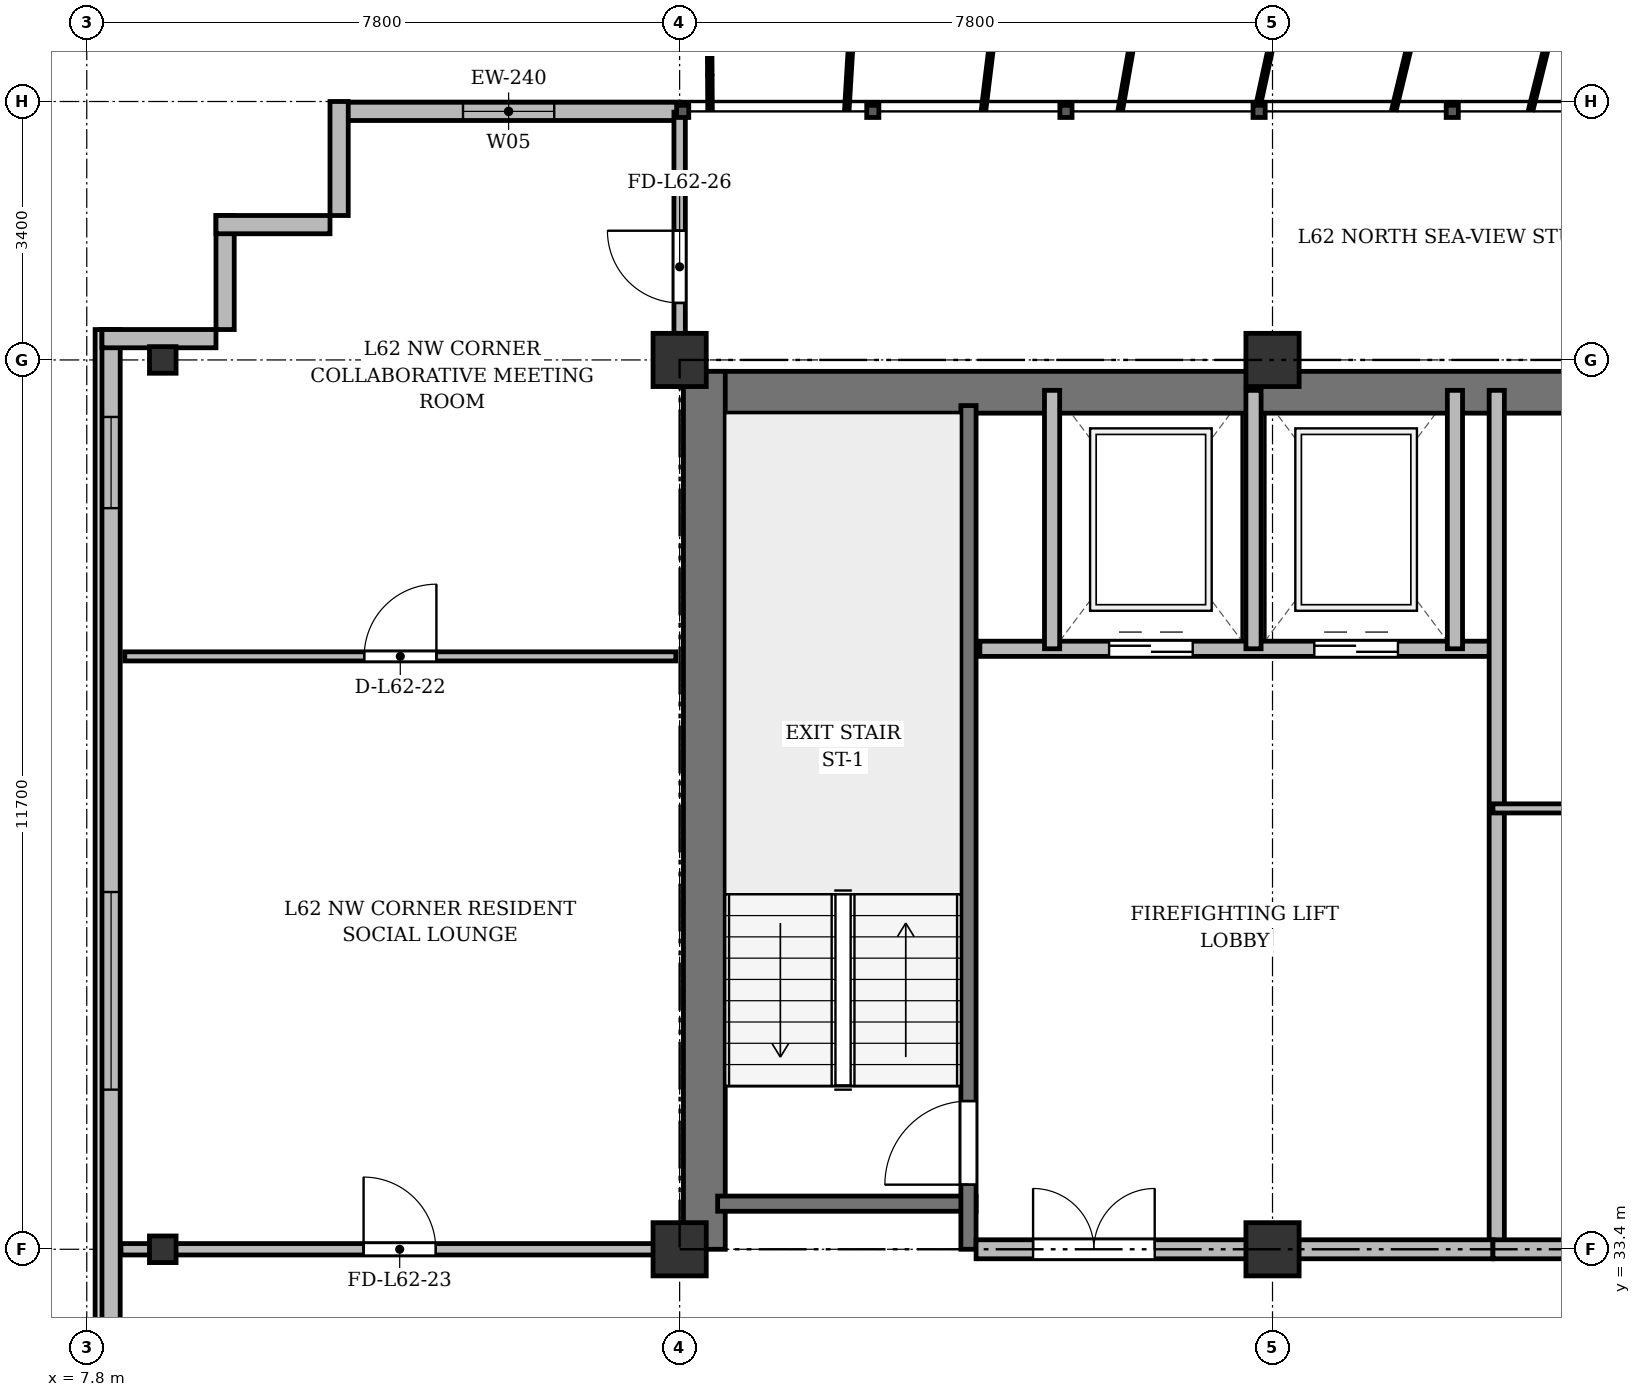
"""IFC4 building model, lengths in metres.
Left out: names, types, materials, properties, quantities, classifications, styles, units other than length and angle.
Written with IfcOpenShell. Run it as: python <this file> out.ifc"""

import sys

from ifc_helpers import new_model, si_unit, direction, frame, frame_2d, origin, origin_2d, place, context, subcontext, project, spatial, rectangle, i_section, extrude, source, transform, mapped, element, fill, save


model = new_model("IFC4")
c1 = context("Model", 3, precision=1e-05, world=origin(), true_north=direction((0.0, 1.0)))
c2 = subcontext(c1, "Body", "Model", "MODEL_VIEW")
j1 = project(units=[si_unit("LENGTHUNIT", "METRE"), si_unit("PLANEANGLEUNIT", "RADIAN")], contexts=[c1])
p1 = place(None, origin())
s1 = spatial("IfcSite", under=j1, at=p1, CompositionType="ELEMENT")
p2 = place(p1, origin())
s2 = spatial("IfcBuilding", under=s1, at=p2, CompositionType="ELEMENT")
p3 = place(p2, frame((0.0, 0.0, 237.3)))
s3 = spatial("IfcBuildingStorey", under=s2, at=p3, CompositionType="ELEMENT", Elevation=237.3)
m1 = source(origin(), c2, "Body", "SweptSolid", [
    extrude(i_section(OverallWidth=0.35, OverallDepth=0.35, WebThickness=0.018, FlangeThickness=0.028, at=origin_2d()), origin(), (0.0, 0.0, 1.0), 3.6),
])
for number, where, z_axis, x_axis in (
    (1, (8.8, 33.4, 0.0), (0.0, 0.0, 1.0), (1.0, 0.0, 0.0)),
    (2, (8.8, 45.1, 0.0), (0.0, 0.0, 1.0), (1.0, 0.0, 0.0)),
):
    element("IfcColumn", number, at=place(p3, frame(where, z_axis=z_axis, x_axis=x_axis)), inside=s3, PredefinedType="COLUMN", context=c2, shape_type="MappedRepresentation", body=[
        mapped(m1, transform((0.0, 0.0, 0.0), x_axis=(1.0, 0.0, 0.0), y_axis=(0.0, 1.0, 0.0), z_axis=(0.0, 0.0, 1.0), scale=1.0)),
    ])
m2 = source(origin(), c2, "Body", "SweptSolid", [
    extrude(rectangle(XDim=0.7, YDim=0.7, at=origin_2d()), origin(), (0.0, 0.0, 1.0), 3.6),
])
for number, where, z_axis, x_axis in (
    (3, (15.6, 33.4, 0.0), (0.0, 0.0, 1.0), (1.0, 0.0, 0.0)),
    (4, (15.6, 45.1, 0.0), (0.0, 0.0, 1.0), (1.0, 0.0, 0.0)),
    (5, (23.4, 33.4, 0.0), (0.0, 0.0, 1.0), (1.0, 0.0, 0.0)),
    (6, (23.4, 45.1, 0.0), (0.0, 0.0, 1.0), (1.0, 0.0, 0.0)),
):
    element("IfcColumn", number, at=place(p3, frame(where, z_axis=z_axis, x_axis=x_axis)), inside=s3, PredefinedType="COLUMN", context=c2, shape_type="MappedRepresentation", body=[
        mapped(m2, transform((0.0, 0.0, 0.0), x_axis=(1.0, 0.0, 0.0), y_axis=(0.0, 1.0, 0.0), z_axis=(0.0, 0.0, 1.0), scale=1.0)),
    ])
p4 = place(p3, frame((11.1, 48.37, 0.0), z_axis=(0.0, 0.0, 1.0), x_axis=(1.0, 0.0, 0.0)))
e7 = element("IfcWall", 7, at=p4, inside=s3, PredefinedType="SOLIDWALL", context=c2, shape_type="SweptSolid", body=[
    extrude(rectangle(XDim=4.5, YDim=0.24, at=frame_2d((2.25, 0.0))), origin(), (0.0, 0.0, 1.0), 3.22),
])
p5 = place(p4, frame((1.65, 0.0, 0.9)))
e8 = element("IfcOpeningElement", 8, at=p5, cuts=e7, PredefinedType="OPENING", context=c2, shape_type="SweptSolid", body=[
    extrude(rectangle(XDim=1.2, YDim=1.65, at=frame_2d((0.6, 0.825))), frame((0.0, 0.13, 0.0), z_axis=(0.0, -1.0, 0.0), x_axis=(1.0, 0.0, 0.0)), (0.0, 0.0, 1.0), 0.26),
])
p6 = place(p3, frame((8.12, 6.4, 0.0), z_axis=(0.0, 0.0, 1.0), x_axis=(0.0, 1.0, 0.0)))
e9 = element("IfcWall", 9, at=p6, inside=s3, PredefinedType="SOLIDWALL", context=c2, shape_type="SweptSolid", body=[
    extrude(rectangle(XDim=39.1, YDim=0.24, at=frame_2d((19.55, 0.0))), origin(), (0.0, 0.0, 1.0), 3.22),
])
p7 = place(p6, frame((1.45, 0.0, 0.92)))
e10 = element("IfcOpeningElement", 10, at=p7, cuts=e9, PredefinedType="OPENING", context=c2, shape_type="SweptSolid", body=[
    extrude(rectangle(XDim=1.2, YDim=1.65, at=frame_2d((0.6, 0.825))), frame((0.0, 0.13, 0.0), z_axis=(0.0, -1.0, 0.0), x_axis=(1.0, 0.0, 0.0)), (0.0, 0.0, 1.0), 0.26),
])
p8 = place(p6, frame((3.7, 0.0, 0.92)))
e11 = element("IfcOpeningElement", 11, at=p8, cuts=e9, PredefinedType="OPENING", context=c2, shape_type="SweptSolid", body=[
    extrude(rectangle(XDim=2.6, YDim=1.9, at=frame_2d((1.3, 0.95))), frame((0.0, 0.13, 0.0), z_axis=(0.0, -1.0, 0.0), x_axis=(1.0, 0.0, 0.0)), (0.0, 0.0, 1.0), 0.26),
])
p9 = place(p6, frame((7.9, 0.0, 0.92)))
e12 = element("IfcOpeningElement", 12, at=p9, cuts=e9, PredefinedType="OPENING", context=c2, shape_type="SweptSolid", body=[
    extrude(rectangle(XDim=2.6, YDim=1.9, at=frame_2d((1.3, 0.95))), frame((0.0, 0.13, 0.0), z_axis=(0.0, -1.0, 0.0), x_axis=(1.0, 0.0, 0.0)), (0.0, 0.0, 1.0), 0.26),
])
p10 = place(p6, frame((15.1, 0.0, 0.92)))
e13 = element("IfcOpeningElement", 13, at=p10, cuts=e9, PredefinedType="OPENING", context=c2, shape_type="SweptSolid", body=[
    extrude(rectangle(XDim=2.6, YDim=1.9, at=frame_2d((1.3, 0.95))), frame((0.0, 0.13, 0.0), z_axis=(0.0, -1.0, 0.0), x_axis=(1.0, 0.0, 0.0)), (0.0, 0.0, 1.0), 0.26),
])
p11 = place(p6, frame((29.1, 0.0, 0.92)))
e14 = element("IfcOpeningElement", 14, at=p11, cuts=e9, PredefinedType="OPENING", context=c2, shape_type="SweptSolid", body=[
    extrude(rectangle(XDim=2.6, YDim=1.9, at=frame_2d((1.3, 0.95))), frame((0.0, 0.13, 0.0), z_axis=(0.0, -1.0, 0.0), x_axis=(1.0, 0.0, 0.0)), (0.0, 0.0, 1.0), 0.26),
])
p12 = place(p6, frame((36.75, 0.0, 0.92)))
e15 = element("IfcOpeningElement", 15, at=p12, cuts=e9, PredefinedType="OPENING", context=c2, shape_type="SweptSolid", body=[
    extrude(rectangle(XDim=1.2, YDim=1.65, at=frame_2d((0.6, 0.825))), frame((0.0, 0.13, 0.0), z_axis=(0.0, -1.0, 0.0), x_axis=(1.0, 0.0, 0.0)), (0.0, 0.0, 1.0), 0.26),
])
for number, where, z_axis, x_axis in (
    (16, (8.0, 45.38, 0.0), (0.0, 0.0, 1.0), (1.0, 0.0, 0.0)),
    (17, (9.62, 45.5, 0.0), (0.0, 0.0, 1.0), (0.0, 1.0, 0.0)),
    (18, (9.5, 46.88, 0.0), (0.0, 0.0, 1.0), (1.0, 0.0, 0.0)),
    (19, (11.12, 47.0, 0.0), (0.0, 0.0, 1.0), (0.0, 1.0, 0.0)),
):
    element("IfcWall", number, at=place(p3, frame(where, z_axis=z_axis, x_axis=x_axis)), inside=s3, PredefinedType="SOLIDWALL", context=c2, shape_type="SweptSolid", body=[
        extrude(rectangle(XDim=1.5, YDim=0.24, at=frame_2d((0.75, 0.0))), origin(), (0.0, 0.0, 1.0), 3.22),
    ])
p13 = place(p3, frame((15.65, 44.675, 0.0), z_axis=(0.0, 0.0, 1.0), x_axis=(1.0, 0.0, 0.0)))
e20 = element("IfcWall", 20, at=p13, inside=s3, PredefinedType="SHEAR", context=c2, shape_type="SweptSolid", body=[
    extrude(rectangle(XDim=43.1, YDim=0.55, at=frame_2d((21.55, 0.0))), origin(), (0.0, 0.0, 1.0), 3.22),
])
p14 = place(p3, frame((15.925, 33.4, 0.0), z_axis=(0.0, 0.0, 1.0), x_axis=(0.0, 1.0, 0.0)))
e21 = element("IfcWall", 21, at=p14, inside=s3, PredefinedType="SHEAR", context=c2, shape_type="SweptSolid", body=[
    extrude(rectangle(XDim=11.55, YDim=0.55, at=frame_2d((5.775, 0.0))), origin(), (0.0, 0.0, 1.0), 3.22),
])
p15 = place(p3, frame((16.1, 34.0, 0.0), z_axis=(0.0, 0.0, 1.0), x_axis=(1.0, 0.0, 0.0)))
e22 = element("IfcWall", 22, at=p15, inside=s3, PredefinedType="SHEAR", context=c2, shape_type="SweptSolid", body=[
    extrude(rectangle(XDim=3.4, YDim=0.2, at=frame_2d((1.7, 0.0))), origin(), (0.0, 0.0, 1.0), 3.22),
])
p16 = place(p3, frame((19.4, 33.4, 0.0), z_axis=(0.0, 0.0, 1.0), x_axis=(0.0, 1.0, 0.0)))
e23 = element("IfcWall", 23, at=p16, inside=s3, PredefinedType="SHEAR", context=c2, shape_type="SweptSolid", body=[
    extrude(rectangle(XDim=11.1, YDim=0.2, at=frame_2d((5.55, 0.0))), origin(), (0.0, 0.0, 1.0), 3.22),
])
p17 = place(p16, frame((0.85, 0.0, 0.0)))
e24 = element("IfcOpeningElement", 24, at=p17, cuts=e23, PredefinedType="OPENING", context=c2, shape_type="SweptSolid", body=[
    extrude(rectangle(XDim=1.1, YDim=2.15, at=frame_2d((0.55, 1.075))), frame((0.0, 0.11, 0.0), z_axis=(0.0, -1.0, 0.0), x_axis=(1.0, 0.0, 0.0)), (0.0, 0.0, 1.0), 0.22),
])
p18 = place(p3, frame((19.55, 41.3, 0.0), z_axis=(0.0, 0.0, 1.0), x_axis=(1.0, 0.0, 0.0)))
e25 = element("IfcWall", 25, at=p18, inside=s3, PredefinedType="SOLIDWALL", context=c2, shape_type="SweptSolid", body=[
    extrude(rectangle(XDim=6.75, YDim=0.2, at=frame_2d((3.375, 0.0))), origin(), (0.0, 0.0, 1.0), 3.22),
])
p19 = place(p18, frame((1.7, 0.0, 0.0)))
e26 = element("IfcOpeningElement", 26, at=p19, cuts=e25, PredefinedType="OPENING", context=c2, shape_type="SweptSolid", body=[
    extrude(rectangle(XDim=1.1, YDim=2.15, at=frame_2d((0.55, 1.075))), frame((0.0, 0.11, 0.0), z_axis=(0.0, -1.0, 0.0), x_axis=(1.0, 0.0, 0.0)), (0.0, 0.0, 1.0), 0.22),
])
p20 = place(p18, frame((4.4, 0.0, 0.0)))
e27 = element("IfcOpeningElement", 27, at=p20, cuts=e25, PredefinedType="OPENING", context=c2, shape_type="SweptSolid", body=[
    extrude(rectangle(XDim=1.1, YDim=2.15, at=frame_2d((0.55, 1.075))), frame((0.0, 0.11, 0.0), z_axis=(0.0, -1.0, 0.0), x_axis=(1.0, 0.0, 0.0)), (0.0, 0.0, 1.0), 0.22),
])
for number, where, z_axis, x_axis in (
    (28, (20.5, 41.3, 0.0), (0.0, 0.0, 1.0), (0.0, 1.0, 0.0)),
    (29, (23.15, 41.3, 0.0), (0.0, 0.0, 1.0), (0.0, 1.0, 0.0)),
    (30, (25.8, 41.3, 0.0), (0.0, 0.0, 1.0), (0.0, 1.0, 0.0)),
):
    element("IfcWall", number, at=place(p3, frame(where, z_axis=z_axis, x_axis=x_axis)), inside=s3, PredefinedType="SOLIDWALL", context=c2, shape_type="SweptSolid", body=[
        extrude(rectangle(XDim=3.4, YDim=0.2, at=frame_2d((1.7, 0.0))), origin(), (0.0, 0.0, 1.0), 3.22),
    ])
p21 = place(p3, frame((26.35, 33.4, 0.0), z_axis=(0.0, 0.0, 1.0), x_axis=(0.0, 1.0, 0.0)))
e31 = element("IfcWall", 31, at=p21, inside=s3, PredefinedType="SOLIDWALL", context=c2, shape_type="SweptSolid", body=[
    extrude(rectangle(XDim=11.3, YDim=0.2, at=frame_2d((5.65, 0.0))), origin(), (0.0, 0.0, 1.0), 2.77),
])
p22 = place(p3, frame((19.5, 33.4, 0.0), z_axis=(0.0, 0.0, 1.0), x_axis=(1.0, 0.0, 0.0)))
e32 = element("IfcWall", 32, at=p22, inside=s3, PredefinedType="PARTITIONING", context=c2, shape_type="SweptSolid", body=[
    extrude(rectangle(XDim=6.8, YDim=0.25, at=frame_2d((3.4, 0.0))), origin(), (0.0, 0.0, 1.0), 2.77),
])
p23 = place(p22, frame((0.75, 0.0, 0.0)))
e33 = element("IfcOpeningElement", 33, at=p23, cuts=e32, PredefinedType="OPENING", context=c2, shape_type="SweptSolid", body=[
    extrude(rectangle(XDim=1.6, YDim=2.2, at=frame_2d((0.8, 1.1))), frame((0.0, 0.135, 0.0), z_axis=(0.0, -1.0, 0.0), x_axis=(1.0, 0.0, 0.0)), (0.0, 0.0, 1.0), 0.27),
])
p24 = place(p3, frame((26.3, 39.2, 0.0), z_axis=(0.0, 0.0, 1.0), x_axis=(1.0, 0.0, 0.0)))
e34 = element("IfcWall", 34, at=p24, inside=s3, PredefinedType="PARTITIONING", context=c2, shape_type="SweptSolid", body=[
    extrude(rectangle(XDim=7.0, YDim=0.12, at=frame_2d((3.5, 0.0))), origin(), (0.0, 0.0, 1.0), 2.72),
])
p25 = place(p24, frame((2.6, 0.0, 0.0)))
e35 = element("IfcOpeningElement", 35, at=p25, cuts=e34, PredefinedType="OPENING", context=c2, shape_type="SweptSolid", body=[
    extrude(rectangle(XDim=0.95, YDim=2.15, at=frame_2d((0.475, 1.075))), frame((0.0, 0.07, 0.0), z_axis=(0.0, -1.0, 0.0), x_axis=(1.0, 0.0, 0.0)), (0.0, 0.0, 1.0), 0.14),
])
p26 = place(p3, frame((26.3, 33.4, 0.0), z_axis=(0.0, 0.0, 1.0), x_axis=(1.0, 0.0, 0.0)))
e36 = element("IfcWall", 36, at=p26, inside=s3, PredefinedType="PARTITIONING", context=c2, shape_type="SweptSolid", body=[
    extrude(rectangle(XDim=7.0, YDim=0.25, at=frame_2d((3.5, 0.0))), origin(), (0.0, 0.0, 1.0), 2.77),
])
p27 = place(p26, frame((1.35, 0.0, 0.0)))
e37 = element("IfcOpeningElement", 37, at=p27, cuts=e36, PredefinedType="OPENING", context=c2, shape_type="SweptSolid", body=[
    extrude(rectangle(XDim=0.95, YDim=2.15, at=frame_2d((0.475, 1.075))), frame((0.0, 0.135, 0.0), z_axis=(0.0, -1.0, 0.0), x_axis=(1.0, 0.0, 0.0)), (0.0, 0.0, 1.0), 0.27),
])
p28 = place(p3, frame((8.3, 41.2, 0.0), z_axis=(0.0, 0.0, 1.0), x_axis=(1.0, 0.0, 0.0)))
e38 = element("IfcWall", 38, at=p28, inside=s3, PredefinedType="PARTITIONING", context=c2, shape_type="SweptSolid", body=[
    extrude(rectangle(XDim=7.25, YDim=0.12, at=frame_2d((3.625, 0.0))), origin(), (0.0, 0.0, 1.0), 2.72),
])
p29 = place(p28, frame((3.15, 0.0, 0.0)))
e39 = element("IfcOpeningElement", 39, at=p29, cuts=e38, PredefinedType="OPENING", context=c2, shape_type="SweptSolid", body=[
    extrude(rectangle(XDim=0.95, YDim=2.15, at=frame_2d((0.475, 1.075))), frame((0.0, 0.07, 0.0), z_axis=(0.0, -1.0, 0.0), x_axis=(1.0, 0.0, 0.0)), (0.0, 0.0, 1.0), 0.14),
])
p30 = place(p3, frame((8.25, 33.4, 0.0), z_axis=(0.0, 0.0, 1.0), x_axis=(1.0, 0.0, 0.0)))
e40 = element("IfcWall", 40, at=p30, inside=s3, PredefinedType="PARTITIONING", context=c2, shape_type="SweptSolid", body=[
    extrude(rectangle(XDim=7.35, YDim=0.15, at=frame_2d((3.675, 0.0))), origin(), (0.0, 0.0, 1.0), 2.77),
])
p31 = place(p30, frame((3.192, 0.0, 0.0)))
e41 = element("IfcOpeningElement", 41, at=p31, cuts=e40, PredefinedType="OPENING", context=c2, shape_type="SweptSolid", body=[
    extrude(rectangle(XDim=0.95, YDim=2.15, at=frame_2d((0.475, 1.075))), frame((0.0, 0.085, 0.0), z_axis=(0.0, -1.0, 0.0), x_axis=(1.0, 0.0, 0.0)), (0.0, 0.0, 1.0), 0.17),
])
p32 = place(p3, frame((15.6, 44.75, 0.0), z_axis=(0.0, 0.0, 1.0), x_axis=(0.0, 1.0, 0.0)))
e42 = element("IfcWall", 42, at=p32, inside=s3, PredefinedType="PARTITIONING", context=c2, shape_type="SweptSolid", body=[
    extrude(rectangle(XDim=3.61, YDim=0.15, at=frame_2d((1.805, 0.0))), origin(), (0.0, 0.0, 1.0), 2.72),
])
p33 = place(p32, frame((1.1, 0.0, 0.0)))
e43 = element("IfcOpeningElement", 43, at=p33, cuts=e42, PredefinedType="OPENING", context=c2, shape_type="SweptSolid", body=[
    extrude(rectangle(XDim=0.95, YDim=2.15, at=frame_2d((0.475, 1.075))), frame((0.0, 0.085, 0.0), z_axis=(0.0, -1.0, 0.0), x_axis=(1.0, 0.0, 0.0)), (0.0, 0.0, 1.0), 0.17),
])
m3 = source(origin(), c2, "Body", "SweptSolid", [
    extrude(rectangle(XDim=1.2, YDim=1.65, at=frame_2d((0.6, 0.825))), frame((0.0, 0.03, 0.0), z_axis=(0.0, -1.0, 0.0), x_axis=(1.0, 0.0, 0.0)), (0.0, 0.0, 1.0), 0.06),
])
p34 = place(p5, origin())
e44 = element("IfcWindow", 44, at=p34, inside=s3, PartitioningType="SINGLE_PANEL", PredefinedType="WINDOW", context=c2, shape_type="MappedRepresentation", body=[
    mapped(m3, transform((0.0, 0.0, 0.0), x_axis=(1.0, 0.0, 0.0), y_axis=(0.0, 1.0, 0.0), z_axis=(0.0, 0.0, 1.0), scale=1.0)),
])
fill(e8, e44)
m4 = source(origin(), c2, "Body", "SweptSolid", [
    extrude(rectangle(XDim=2.6, YDim=1.9, at=frame_2d((1.3, 0.95))), frame((0.0, 0.03, 0.0), z_axis=(0.0, -1.0, 0.0), x_axis=(1.0, 0.0, 0.0)), (0.0, 0.0, 1.0), 0.06),
])
p35 = place(p11, origin())
e45 = element("IfcWindow", 45, at=p35, inside=s3, PartitioningType="SINGLE_PANEL", PredefinedType="WINDOW", context=c2, shape_type="MappedRepresentation", body=[
    mapped(m4, transform((0.0, 0.0, 0.0), x_axis=(1.0, 0.0, 0.0), y_axis=(0.0, 1.0, 0.0), z_axis=(0.0, 0.0, 1.0), scale=1.0)),
])
fill(e14, e45)
p36 = place(p12, origin())
e46 = element("IfcWindow", 46, at=p36, inside=s3, PartitioningType="SINGLE_PANEL", PredefinedType="WINDOW", context=c2, shape_type="MappedRepresentation", body=[
    mapped(m3, transform((0.0, 0.0, 0.0), x_axis=(1.0, 0.0, 0.0), y_axis=(0.0, 1.0, 0.0), z_axis=(0.0, 0.0, 1.0), scale=1.0)),
])
fill(e15, e46)
m5 = source(origin(), c2, "Body", "SweptSolid", [
    extrude(rectangle(XDim=1.1, YDim=2.15, at=frame_2d((0.55, 1.075))), frame((0.0, 0.025, 0.0), z_axis=(0.0, -1.0, 0.0), x_axis=(1.0, 0.0, 0.0)), (0.0, 0.0, 1.0), 0.05),
])
p37 = place(p17, origin())
e47 = element("IfcDoor", 47, at=p37, inside=s3, OperationType="SINGLE_SWING_LEFT", PredefinedType="DOOR", context=c2, shape_type="MappedRepresentation", body=[
    mapped(m5, transform((0.0, 0.0, 0.0), x_axis=(1.0, 0.0, 0.0), y_axis=(0.0, 1.0, 0.0), z_axis=(0.0, 0.0, 1.0), scale=1.0)),
])
fill(e24, e47)
p38 = place(p19, origin())
e48 = element("IfcDoor", 48, at=p38, inside=s3, OperationType="DOUBLE_DOOR_SLIDING", PredefinedType="DOOR", context=c2, shape_type="MappedRepresentation", body=[
    mapped(m5, transform((0.0, 0.0, 0.0), x_axis=(1.0, 0.0, 0.0), y_axis=(0.0, 1.0, 0.0), z_axis=(0.0, 0.0, 1.0), scale=1.0)),
])
fill(e26, e48)
p39 = place(p20, origin())
e49 = element("IfcDoor", 49, at=p39, inside=s3, OperationType="DOUBLE_DOOR_SLIDING", PredefinedType="DOOR", context=c2, shape_type="MappedRepresentation", body=[
    mapped(m5, transform((0.0, 0.0, 0.0), x_axis=(1.0, 0.0, 0.0), y_axis=(0.0, 1.0, 0.0), z_axis=(0.0, 0.0, 1.0), scale=1.0)),
])
fill(e27, e49)
m6 = source(origin(), c2, "Body", "SweptSolid", [
    extrude(rectangle(XDim=1.6, YDim=2.2, at=frame_2d((0.8, 1.1))), frame((0.0, 0.025, 0.0), z_axis=(0.0, -1.0, 0.0), x_axis=(1.0, 0.0, 0.0)), (0.0, 0.0, 1.0), 0.05),
])
p40 = place(p23, origin())
e50 = element("IfcDoor", 50, at=p40, inside=s3, OperationType="DOUBLE_DOOR_SINGLE_SWING", PredefinedType="DOOR", context=c2, shape_type="MappedRepresentation", body=[
    mapped(m6, transform((0.0, 0.0, 0.0), x_axis=(1.0, 0.0, 0.0), y_axis=(0.0, 1.0, 0.0), z_axis=(0.0, 0.0, 1.0), scale=1.0)),
])
fill(e33, e50)
m7 = source(origin(), c2, "Body", "SweptSolid", [
    extrude(rectangle(XDim=0.95, YDim=2.15, at=frame_2d((0.475, 1.075))), frame((0.0, 0.025, 0.0), z_axis=(0.0, -1.0, 0.0), x_axis=(1.0, 0.0, 0.0)), (0.0, 0.0, 1.0), 0.05),
])
p41 = place(p29, origin())
e51 = element("IfcDoor", 51, at=p41, inside=s3, OperationType="SINGLE_SWING_RIGHT", PredefinedType="DOOR", context=c2, shape_type="MappedRepresentation", body=[
    mapped(m7, transform((0.0, 0.0, 0.0), x_axis=(1.0, 0.0, 0.0), y_axis=(0.0, 1.0, 0.0), z_axis=(0.0, 0.0, 1.0), scale=1.0)),
])
fill(e39, e51)
p42 = place(p31, origin())
e52 = element("IfcDoor", 52, at=p42, inside=s3, OperationType="SINGLE_SWING_LEFT", PredefinedType="DOOR", context=c2, shape_type="MappedRepresentation", body=[
    mapped(m7, transform((0.0, 0.0, 0.0), x_axis=(1.0, 0.0, 0.0), y_axis=(0.0, 1.0, 0.0), z_axis=(0.0, 0.0, 1.0), scale=1.0)),
])
fill(e41, e52)
p43 = place(p33, origin())
e53 = element("IfcDoor", 53, at=p43, inside=s3, OperationType="SINGLE_SWING_RIGHT", PredefinedType="DOOR", context=c2, shape_type="MappedRepresentation", body=[
    mapped(m7, transform((0.0, 0.0, 0.0), x_axis=(1.0, 0.0, 0.0), y_axis=(0.0, 1.0, 0.0), z_axis=(0.0, 0.0, 1.0), scale=1.0)),
])
fill(e43, e53)
save(model, sys.argv[1])
